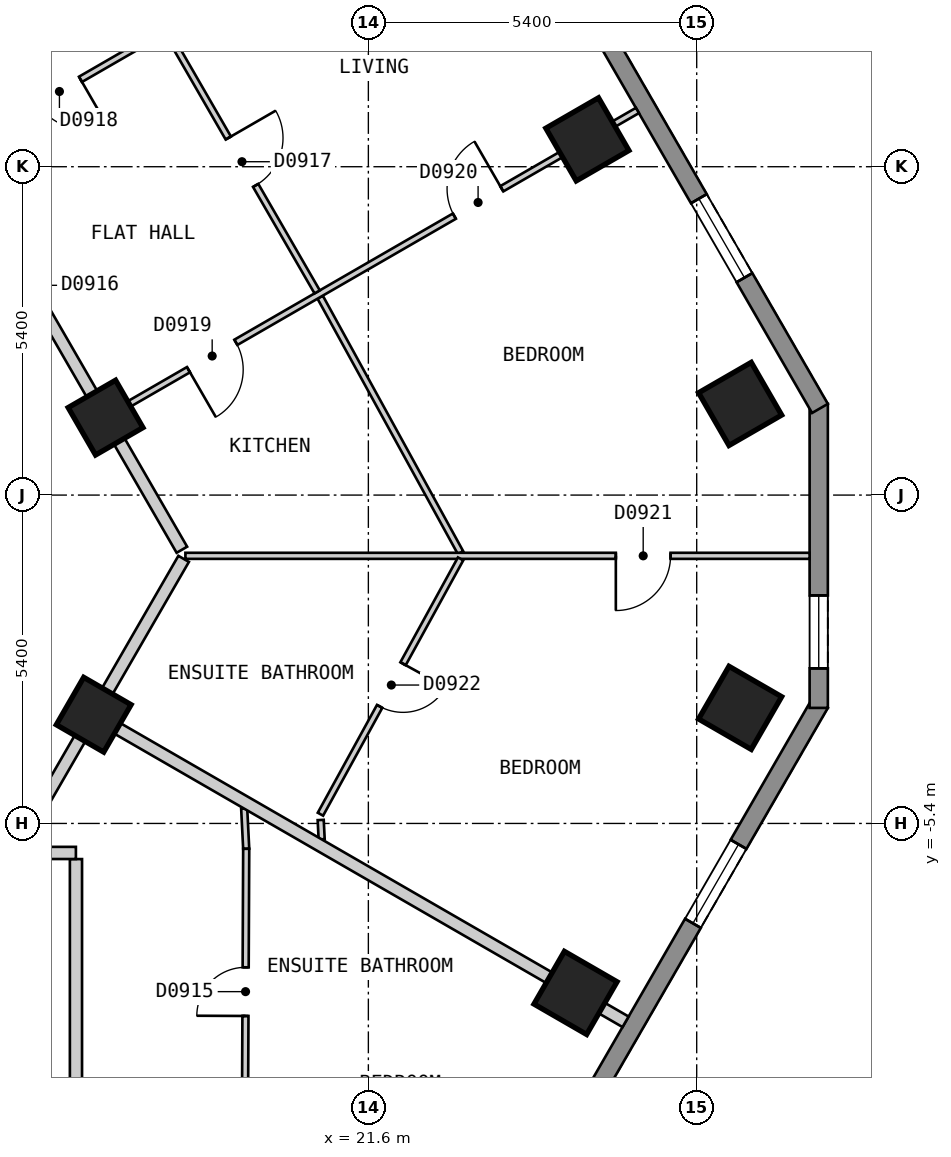
"""IFC4 building model, lengths in metres.
Left out: names, types, materials, properties, quantities, classifications, styles, units other than length and angle.
Written with IfcOpenShell. Run it as: python <this file> out.ifc"""

import sys

from ifc_helpers import new_model, si_unit, direction, frame, frame_2d, origin, origin_2d, place, context, subcontext, project, spatial, polyline, rectangle, outline, extrude, element, fill, save


model = new_model("IFC4")
c1 = context("Model", 3, precision=1e-05, world=origin(), true_north=direction((0.0, 1.0)))
c2 = subcontext(c1, "Body", "Model", "MODEL_VIEW")
j1 = project(units=[si_unit("LENGTHUNIT", "METRE"), si_unit("PLANEANGLEUNIT", "RADIAN")], contexts=[c1])
p1 = place(None, origin())
s1 = spatial("IfcSite", under=j1, at=p1, CompositionType="ELEMENT")
p2 = place(p1, origin())
s2 = spatial("IfcBuilding", under=s1, at=p2, CompositionType="ELEMENT")
p3 = place(p2, frame((0.0, 0.0, 102.0)))
s3 = spatial("IfcBuildingStorey", under=s2, at=p3, CompositionType="ELEMENT", Elevation=102.0)
for number, where, z_axis, x_axis in (
    (1, (25.007, -8.187, 0.0), (0.0, 0.0, 1.0), (0.5, 0.866, 0.0)),
    (2, (27.714, -3.499, 0.0), (0.0, 0.0, 1.0), (0.5, 0.866, 0.0)),
    (3, (27.714, 1.499, 0.0), (0.0, 0.0, 1.0), (-0.5, 0.866, 0.0)),
    (4, (25.202, 5.85, 0.0), (0.0, 0.0, 1.0), (-0.5, 0.866, 0.0)),
):
    element("IfcColumn", number, at=place(p3, frame(where, z_axis=z_axis, x_axis=x_axis)), inside=s3, PredefinedType="COLUMN", context=c2, shape_type="SweptSolid", body=[
        extrude(rectangle(XDim=1.0, YDim=1.0, at=origin_2d()), origin(), (0.0, 0.0, 1.0), 3.0),
    ])
for number, where, z_axis, x_axis in (
    (5, (17.083, -3.612, 0.0), (0.0, 0.0, 1.0), (0.5, 0.866, 0.0)),
    (6, (17.278, 1.274, 0.0), (0.0, 0.0, 1.0), (-0.5, 0.866, 0.0)),
):
    element("IfcColumn", number, at=place(p3, frame(where, z_axis=z_axis, x_axis=x_axis)), inside=s3, PredefinedType="COLUMN", context=c2, shape_type="SweptSolid", body=[
        extrude(rectangle(XDim=0.9, YDim=0.9, at=origin_2d()), origin(), (0.0, 0.0, 1.0), 3.0),
    ])
p4 = place(p3, frame((17.479, -23.425, 0.0), z_axis=(0.0, 0.0, 1.0), x_axis=(0.500035407905, 0.866004960056, 0.0)))
e7 = element("IfcWall", 7, at=p4, inside=s3, PredefinedType="SOLIDWALL", context=c2, shape_type="SweptSolid", body=[
    extrude(outline(polyline([(0.0, -0.15), (23.094, -0.15), (23.014, 0.15), (0.08, 0.15), (0.0, -0.15)])), origin(), (0.0, 0.0, 1.0), 2.7),
])
p5 = place(p4, frame((2.677, 0.0, 0.15)))
e8 = element("IfcOpeningElement", 8, at=p5, cuts=e7, PredefinedType="OPENING", context=c2, shape_type="SweptSolid", body=[
    extrude(rectangle(XDim=1.5, YDim=2.1, at=frame_2d((0.75, 1.05))), frame((0.0, 0.16, 0.0), z_axis=(0.0, -1.0, 0.0), x_axis=(1.0, 0.0, 0.0)), (0.0, 0.0, 1.0), 0.32),
])
p6 = place(p4, frame((8.091, 0.0, 0.15)))
e9 = element("IfcOpeningElement", 9, at=p6, cuts=e7, PredefinedType="OPENING", context=c2, shape_type="SweptSolid", body=[
    extrude(rectangle(XDim=1.5, YDim=2.1, at=frame_2d((0.75, 1.05))), frame((0.0, 0.16, 0.0), z_axis=(0.0, -1.0, 0.0), x_axis=(1.0, 0.0, 0.0)), (0.0, 0.0, 1.0), 0.32),
])
p7 = place(p4, frame((13.504, 0.0, 0.15)))
e10 = element("IfcOpeningElement", 10, at=p7, cuts=e7, PredefinedType="OPENING", context=c2, shape_type="SweptSolid", body=[
    extrude(rectangle(XDim=1.5, YDim=2.1, at=frame_2d((0.75, 1.05))), frame((0.0, 0.16, 0.0), z_axis=(0.0, -1.0, 0.0), x_axis=(1.0, 0.0, 0.0)), (0.0, 0.0, 1.0), 0.32),
])
p8 = place(p4, frame((18.917, 0.0, 0.15)))
e11 = element("IfcOpeningElement", 11, at=p8, cuts=e7, PredefinedType="OPENING", context=c2, shape_type="SweptSolid", body=[
    extrude(rectangle(XDim=1.5, YDim=2.1, at=frame_2d((0.75, 1.05))), frame((0.0, 0.16, 0.0), z_axis=(0.0, -1.0, 0.0), x_axis=(1.0, 0.0, 0.0)), (0.0, 0.0, 1.0), 0.32),
])
p9 = place(p3, frame((29.007, -3.5, 0.0), z_axis=(0.0, 0.0, 1.0), x_axis=(0.0, 1.0, 0.0)))
e12 = element("IfcWall", 12, at=p9, inside=s3, PredefinedType="SOLIDWALL", context=c2, shape_type="SweptSolid", body=[
    extrude(outline(polyline([(0.0, -0.15), (5.0, -0.15), (4.92, 0.15), (0.08, 0.15), (0.0, -0.15)])), origin(), (0.0, 0.0, 1.0), 2.7),
])
p10 = place(p9, frame((0.65, 0.0, 0.15)))
e13 = element("IfcOpeningElement", 13, at=p10, cuts=e12, PredefinedType="OPENING", context=c2, shape_type="SweptSolid", body=[
    extrude(rectangle(XDim=1.2, YDim=2.1, at=frame_2d((0.6, 1.05))), frame((0.0, 0.16, 0.0), z_axis=(0.0, -1.0, 0.0), x_axis=(1.0, 0.0, 0.0)), (0.0, 0.0, 1.0), 0.32),
])
p11 = place(p3, frame((29.027, 1.425, 0.0), z_axis=(0.0, 0.0, 1.0), x_axis=(-0.500027479704, 0.866009537788, 0.0)))
e14 = element("IfcWall", 14, at=p11, inside=s3, PredefinedType="SOLIDWALL", context=c2, shape_type="SweptSolid", body=[
    extrude(outline(polyline([(0.0, -0.15), (26.559, -0.15), (26.478, 0.15), (0.08, 0.15), (0.0, -0.15)])), origin(), (0.0, 0.0, 1.0), 2.7),
])
p12 = place(p11, frame((2.483, 0.0, 0.15)))
e15 = element("IfcOpeningElement", 15, at=p12, cuts=e14, PredefinedType="OPENING", context=c2, shape_type="SweptSolid", body=[
    extrude(rectangle(XDim=1.5, YDim=2.1, at=frame_2d((0.75, 1.05))), frame((0.0, 0.16, 0.0), z_axis=(0.0, -1.0, 0.0), x_axis=(1.0, 0.0, 0.0)), (0.0, 0.0, 1.0), 0.32),
])
p13 = place(p11, frame((7.506, 0.0, 0.15)))
e16 = element("IfcOpeningElement", 16, at=p13, cuts=e14, PredefinedType="OPENING", context=c2, shape_type="SweptSolid", body=[
    extrude(rectangle(XDim=1.5, YDim=2.1, at=frame_2d((0.75, 1.05))), frame((0.0, 0.16, 0.0), z_axis=(0.0, -1.0, 0.0), x_axis=(1.0, 0.0, 0.0)), (0.0, 0.0, 1.0), 0.32),
])
p14 = place(p11, frame((12.529, 0.0, 0.15)))
e17 = element("IfcOpeningElement", 17, at=p14, cuts=e14, PredefinedType="OPENING", context=c2, shape_type="SweptSolid", body=[
    extrude(rectangle(XDim=1.5, YDim=2.1, at=frame_2d((0.75, 1.05))), frame((0.0, 0.16, 0.0), z_axis=(0.0, -1.0, 0.0), x_axis=(1.0, 0.0, 0.0)), (0.0, 0.0, 1.0), 0.32),
])
p15 = place(p11, frame((17.552, 0.0, 0.15)))
e18 = element("IfcOpeningElement", 18, at=p15, cuts=e14, PredefinedType="OPENING", context=c2, shape_type="SweptSolid", body=[
    extrude(rectangle(XDim=1.5, YDim=2.1, at=frame_2d((0.75, 1.05))), frame((0.0, 0.16, 0.0), z_axis=(0.0, -1.0, 0.0), x_axis=(1.0, 0.0, 0.0)), (0.0, 0.0, 1.0), 0.32),
])
p16 = place(p11, frame((22.575, 0.0, 0.15)))
e19 = element("IfcOpeningElement", 19, at=p16, cuts=e14, PredefinedType="OPENING", context=c2, shape_type="SweptSolid", body=[
    extrude(rectangle(XDim=1.5, YDim=2.1, at=frame_2d((0.75, 1.05))), frame((0.0, 0.16, 0.0), z_axis=(0.0, -1.0, 0.0), x_axis=(1.0, 0.0, 0.0)), (0.0, 0.0, 1.0), 0.32),
])
p17 = place(p3, frame((8.488, 16.5, 0.0), z_axis=(0.0, 0.0, 1.0), x_axis=(0.499986836607, -0.86603300354, 0.0)))
e20 = element("IfcWall", 20, at=p17, inside=s3, PredefinedType="PARTITIONING", context=c2, shape_type="SweptSolid", body=[
    extrude(rectangle(XDim=20.09, YDim=0.2, at=frame_2d((10.045, 0.0))), origin(), (0.0, 0.0, 1.0), 2.7),
])
p18 = place(p17, frame((14.569, 0.0, 0.0)))
e21 = element("IfcOpeningElement", 21, at=p18, cuts=e20, PredefinedType="OPENING", context=c2, shape_type="SweptSolid", body=[
    extrude(rectangle(XDim=1.0, YDim=2.1, at=frame_2d((0.5, 1.05))), frame((0.0, 0.11, 0.0), z_axis=(0.0, -1.0, 0.0), x_axis=(1.0, 0.0, 0.0)), (0.0, 0.0, 1.0), 0.22),
])
p19 = place(p17, frame((4.547, 0.0, 0.0)))
e22 = element("IfcOpeningElement", 22, at=p19, cuts=e20, PredefinedType="OPENING", context=c2, shape_type="SweptSolid", body=[
    extrude(rectangle(XDim=1.0, YDim=2.1, at=frame_2d((0.5, 1.05))), frame((0.0, 0.11, 0.0), z_axis=(0.0, -1.0, 0.0), x_axis=(1.0, 0.0, 0.0)), (0.0, 0.0, 1.0), 0.22),
])
p20 = place(p3, frame((16.791, -5.986, 0.0), z_axis=(0.0, 0.0, 1.0), x_axis=(0.0, -1.0, 0.0)))
e23 = element("IfcWall", 23, at=p20, inside=s3, PredefinedType="PARTITIONING", context=c2, shape_type="SweptSolid", body=[
    extrude(rectangle(XDim=3.65, YDim=0.2, at=frame_2d((1.825, 0.0))), origin(), (0.0, 0.0, 1.0), 2.7),
])
p21 = place(p3, frame((15.887, -5.885, 0.0), z_axis=(0.0, 0.0, 1.0), x_axis=(1.0, 0.0, 0.0)))
e24 = element("IfcWall", 24, at=p21, inside=s3, PredefinedType="PARTITIONING", context=c2, shape_type="SweptSolid", body=[
    extrude(rectangle(XDim=0.903, YDim=0.2, at=frame_2d((0.452, 0.0))), origin(), (0.0, 0.0, 1.0), 2.7),
])
p22 = place(p3, frame((15.771, -5.884, 0.0), z_axis=(0.0, 0.0, 1.0), x_axis=(0.499939494019, 0.866060334111, 0.0)))
e25 = element("IfcWall", 25, at=p22, inside=s3, PredefinedType="PARTITIONING", context=c2, shape_type="SweptSolid", body=[
    extrude(rectangle(XDim=5.583, YDim=0.2, at=frame_2d((2.792, 0.0))), origin(), (0.0, 0.0, 1.0), 2.7),
])
p23 = place(p3, frame((20.807, 3.255, 0.0), z_axis=(0.0, 0.0, 1.0), x_axis=(0.481604009855, -0.876388942018, 0.0)))
e26 = element("IfcWall", 26, at=p23, inside=s3, PredefinedType="PARTITIONING", context=c2, shape_type="SweptSolid", body=[
    extrude(rectangle(XDim=4.795, YDim=0.1, at=frame_2d((2.397, 0.0))), origin(), (0.0, 0.0, 1.0), 2.7),
])
p24 = place(p3, frame((19.558, -5.156, 0.0), z_axis=(0.0, 0.0, 1.0), x_axis=(0.04980880462, -0.998758771167, 0.0)))
e27 = element("IfcWall", 27, at=p24, inside=s3, PredefinedType="PARTITIONING", context=c2, shape_type="SweptSolid", body=[
    extrude(rectangle(XDim=0.662, YDim=0.1, at=frame_2d((0.331, 0.0))), origin(), (0.0, 0.0, 1.0), 2.7),
])
p25 = place(p3, frame((20.816, -5.343, 0.0), z_axis=(0.0, 0.0, 1.0), x_axis=(0.050626241319, -0.998717669659, 0.0)))
e28 = element("IfcWall", 28, at=p25, inside=s3, PredefinedType="PARTITIONING", context=c2, shape_type="SweptSolid", body=[
    extrude(rectangle(XDim=0.318, YDim=0.1, at=frame_2d((0.159, 0.0))), origin(), (0.0, 0.0, 1.0), 2.7),
])
p26 = place(p3, frame((18.591, -0.999, 0.0), z_axis=(0.0, 0.0, 1.0), x_axis=(1.0, 0.0, 0.0)))
e29 = element("IfcWall", 29, at=p26, inside=s3, PredefinedType="PARTITIONING", context=c2, shape_type="SweptSolid", body=[
    extrude(rectangle(XDim=10.266, YDim=0.1, at=frame_2d((5.133, 0.0))), origin(), (0.0, 0.0, 1.0), 2.7),
])
p27 = place(p26, frame((7.079, 0.0, 0.0)))
e30 = element("IfcOpeningElement", 30, at=p27, cuts=e29, PredefinedType="OPENING", context=c2, shape_type="SweptSolid", body=[
    extrude(rectangle(XDim=0.9, YDim=2.1, at=frame_2d((0.45, 1.05))), frame((0.0, 0.06, 0.0), z_axis=(0.0, -1.0, 0.0), x_axis=(1.0, 0.0, 0.0)), (0.0, 0.0, 1.0), 0.12),
])
p28 = place(p3, frame((20.812, -5.248, 0.0), z_axis=(0.0, 0.0, 1.0), x_axis=(0.481196609449, 0.876612698434, 0.0)))
e31 = element("IfcWall", 31, at=p28, inside=s3, PredefinedType="PARTITIONING", context=c2, shape_type="SweptSolid", body=[
    extrude(rectangle(XDim=4.79, YDim=0.1, at=frame_2d((2.395, 0.0))), origin(), (0.0, 0.0, 1.0), 2.7),
])
p29 = place(p28, frame((2.023, 0.0, 0.0)))
e32 = element("IfcOpeningElement", 32, at=p29, cuts=e31, PredefinedType="OPENING", context=c2, shape_type="SweptSolid", body=[
    extrude(rectangle(XDim=0.8, YDim=2.1, at=frame_2d((0.4, 1.05))), frame((0.0, 0.06, 0.0), z_axis=(0.0, -1.0, 0.0), x_axis=(1.0, 0.0, 0.0)), (0.0, 0.0, 1.0), 0.12),
])
p30 = place(p3, frame((19.566, -11.238, 0.0), z_axis=(0.0, 0.0, 1.0), x_axis=(0.004638545009, 0.999989241892, 0.0)))
e33 = element("IfcWall", 33, at=p30, inside=s3, PredefinedType="PARTITIONING", context=c2, shape_type="SweptSolid", body=[
    extrude(rectangle(XDim=5.421, YDim=0.1, at=frame_2d((2.71, 0.0))), origin(), (0.0, 0.0, 1.0), 2.7),
])
p31 = place(p30, frame((2.672, 0.0, 0.0)))
e34 = element("IfcOpeningElement", 34, at=p31, cuts=e33, PredefinedType="OPENING", context=c2, shape_type="SweptSolid", body=[
    extrude(rectangle(XDim=0.8, YDim=2.1, at=frame_2d((0.4, 1.05))), frame((0.0, 0.06, 0.0), z_axis=(0.0, -1.0, 0.0), x_axis=(1.0, 0.0, 0.0)), (0.0, 0.0, 1.0), 0.12),
])
p32 = place(p3, frame((17.365, 1.325, 0.0), z_axis=(0.0, 0.0, 1.0), x_axis=(0.866016855193, 0.500014806302, 0.0)))
e35 = element("IfcWall", 35, at=p32, inside=s3, PredefinedType="PARTITIONING", context=c2, shape_type="SweptSolid", body=[
    extrude(rectangle(XDim=10.0, YDim=0.1, at=frame_2d((5.0, 0.0))), origin(), (0.0, 0.0, 1.0), 2.7),
])
p33 = place(p32, frame((1.474, 0.0, 0.0)))
e36 = element("IfcOpeningElement", 36, at=p33, cuts=e35, PredefinedType="OPENING", context=c2, shape_type="SweptSolid", body=[
    extrude(rectangle(XDim=0.9, YDim=2.1, at=frame_2d((0.45, 1.05))), frame((0.0, 0.06, 0.0), z_axis=(0.0, -1.0, 0.0), x_axis=(1.0, 0.0, 0.0)), (0.0, 0.0, 1.0), 0.12),
])
p34 = place(p32, frame((6.524, 0.0, 0.0)))
e37 = element("IfcOpeningElement", 37, at=p34, cuts=e35, PredefinedType="OPENING", context=c2, shape_type="SweptSolid", body=[
    extrude(rectangle(XDim=0.9, YDim=2.1, at=frame_2d((0.45, 1.05))), frame((0.0, 0.06, 0.0), z_axis=(0.0, -1.0, 0.0), x_axis=(1.0, 0.0, 0.0)), (0.0, 0.0, 1.0), 0.12),
])
p35 = place(p3, frame((14.853, 5.675, 0.0), z_axis=(0.0, 0.0, 1.0), x_axis=(0.865979019114, 0.500080332001, 0.0)))
e38 = element("IfcWall", 38, at=p35, inside=s3, PredefinedType="PARTITIONING", context=c2, shape_type="SweptSolid", body=[
    extrude(rectangle(XDim=3.897, YDim=0.1, at=frame_2d((1.949, 0.0))), origin(), (0.0, 0.0, 1.0), 2.7),
])
p36 = place(p35, frame((1.524, 0.0, 0.0)))
e39 = element("IfcOpeningElement", 39, at=p36, cuts=e38, PredefinedType="OPENING", context=c2, shape_type="SweptSolid", body=[
    extrude(rectangle(XDim=0.8, YDim=2.1, at=frame_2d((0.4, 1.05))), frame((0.0, 0.06, 0.0), z_axis=(0.0, -1.0, 0.0), x_axis=(1.0, 0.0, 0.0)), (0.0, 0.0, 1.0), 0.12),
])
p37 = place(p3, frame((17.169, -3.662, 0.0), z_axis=(0.0, 0.0, 1.0), x_axis=(0.866047370643, -0.499961950354, 0.0)))
e40 = element("IfcWall", 40, at=p37, inside=s3, PredefinedType="PARTITIONING", context=c2, shape_type="SweptSolid", body=[
    extrude(rectangle(XDim=10.001, YDim=0.2, at=frame_2d((5.0, 0.0))), origin(), (0.0, 0.0, 1.0), 2.7),
])
p38 = place(p3, frame((15.759, 11.998, 0.0), z_axis=(0.0, 0.0, 1.0), x_axis=(0.500068444113, -0.865985883951, 0.0)))
e41 = element("IfcWall", 41, at=p38, inside=s3, PredefinedType="PARTITIONING", context=c2, shape_type="SweptSolid", body=[
    extrude(rectangle(XDim=9.997, YDim=0.1, at=frame_2d((4.998, 0.0))), origin(), (0.0, 0.0, 1.0), 2.7),
])
p39 = place(p38, frame((7.074, 0.0, 0.0)))
e42 = element("IfcOpeningElement", 42, at=p39, cuts=e41, PredefinedType="OPENING", context=c2, shape_type="SweptSolid", body=[
    extrude(rectangle(XDim=0.9, YDim=2.1, at=frame_2d((0.45, 1.05))), frame((0.0, 0.06, 0.0), z_axis=(0.0, -1.0, 0.0), x_axis=(1.0, 0.0, 0.0)), (0.0, 0.0, 1.0), 0.12),
])
p40 = place(p8, origin())
e43 = element("IfcWindow", 43, at=p40, inside=s3, PartitioningType="SINGLE_PANEL", PredefinedType="WINDOW", context=c2, shape_type="SweptSolid", body=[
    extrude(rectangle(XDim=1.5, YDim=2.1, at=frame_2d((0.75, 1.05))), frame((0.0, 0.03, 0.0), z_axis=(0.0, -1.0, 0.0), x_axis=(1.0, 0.0, 0.0)), (0.0, 0.0, 1.0), 0.06),
])
fill(e11, e43)
p41 = place(p10, origin())
e44 = element("IfcWindow", 44, at=p41, inside=s3, PartitioningType="SINGLE_PANEL", PredefinedType="WINDOW", context=c2, shape_type="SweptSolid", body=[
    extrude(rectangle(XDim=1.2, YDim=2.1, at=frame_2d((0.6, 1.05))), frame((0.0, 0.03, 0.0), z_axis=(0.0, -1.0, 0.0), x_axis=(1.0, 0.0, 0.0)), (0.0, 0.0, 1.0), 0.06),
])
fill(e13, e44)
p42 = place(p12, origin())
e45 = element("IfcWindow", 45, at=p42, inside=s3, PartitioningType="SINGLE_PANEL", PredefinedType="WINDOW", context=c2, shape_type="SweptSolid", body=[
    extrude(rectangle(XDim=1.5, YDim=2.1, at=frame_2d((0.75, 1.05))), frame((0.0, 0.03, 0.0), z_axis=(0.0, -1.0, 0.0), x_axis=(1.0, 0.0, 0.0)), (0.0, 0.0, 1.0), 0.06),
])
fill(e15, e45)
p43 = place(p31, origin())
e46 = element("IfcDoor", 46, at=p43, inside=s3, OperationType="SINGLE_SWING_LEFT", PredefinedType="DOOR", context=c2, shape_type="SweptSolid", body=[
    extrude(rectangle(XDim=0.8, YDim=2.1, at=frame_2d((0.4, 1.05))), frame((0.0, 0.025, 0.0), z_axis=(0.0, -1.0, 0.0), x_axis=(1.0, 0.0, 0.0)), (0.0, 0.0, 1.0), 0.05),
])
fill(e34, e46)
p44 = place(p39, origin())
e47 = element("IfcDoor", 47, at=p44, inside=s3, OperationType="SINGLE_SWING_LEFT", PredefinedType="DOOR", context=c2, shape_type="SweptSolid", body=[
    extrude(rectangle(XDim=0.9, YDim=2.1, at=frame_2d((0.45, 1.05))), frame((0.0, 0.025, 0.0), z_axis=(0.0, -1.0, 0.0), x_axis=(1.0, 0.0, 0.0)), (0.0, 0.0, 1.0), 0.05),
])
fill(e42, e47)
p45 = place(p36, origin())
e48 = element("IfcDoor", 48, at=p45, inside=s3, OperationType="SINGLE_SWING_RIGHT", PredefinedType="DOOR", context=c2, shape_type="SweptSolid", body=[
    extrude(rectangle(XDim=0.8, YDim=2.1, at=frame_2d((0.4, 1.05))), frame((0.0, 0.025, 0.0), z_axis=(0.0, -1.0, 0.0), x_axis=(1.0, 0.0, 0.0)), (0.0, 0.0, 1.0), 0.05),
])
fill(e39, e48)
p46 = place(p33, origin())
e49 = element("IfcDoor", 49, at=p46, inside=s3, OperationType="SINGLE_SWING_LEFT", PredefinedType="DOOR", context=c2, shape_type="SweptSolid", body=[
    extrude(rectangle(XDim=0.9, YDim=2.1, at=frame_2d((0.45, 1.05))), frame((0.0, 0.025, 0.0), z_axis=(0.0, -1.0, 0.0), x_axis=(1.0, 0.0, 0.0)), (0.0, 0.0, 1.0), 0.05),
])
fill(e36, e49)
p47 = place(p34, origin())
e50 = element("IfcDoor", 50, at=p47, inside=s3, OperationType="SINGLE_SWING_RIGHT", PredefinedType="DOOR", context=c2, shape_type="SweptSolid", body=[
    extrude(rectangle(XDim=0.9, YDim=2.1, at=frame_2d((0.45, 1.05))), frame((0.0, 0.025, 0.0), z_axis=(0.0, -1.0, 0.0), x_axis=(1.0, 0.0, 0.0)), (0.0, 0.0, 1.0), 0.05),
])
fill(e37, e50)
p48 = place(p27, origin())
e51 = element("IfcDoor", 51, at=p48, inside=s3, OperationType="SINGLE_SWING_LEFT", PredefinedType="DOOR", context=c2, shape_type="SweptSolid", body=[
    extrude(rectangle(XDim=0.9, YDim=2.1, at=frame_2d((0.45, 1.05))), frame((0.0, 0.025, 0.0), z_axis=(0.0, -1.0, 0.0), x_axis=(1.0, 0.0, 0.0)), (0.0, 0.0, 1.0), 0.05),
])
fill(e30, e51)
p49 = place(p29, origin())
e52 = element("IfcDoor", 52, at=p49, inside=s3, OperationType="SINGLE_SWING_RIGHT", PredefinedType="DOOR", context=c2, shape_type="SweptSolid", body=[
    extrude(rectangle(XDim=0.8, YDim=2.1, at=frame_2d((0.4, 1.05))), frame((0.0, 0.025, 0.0), z_axis=(0.0, -1.0, 0.0), x_axis=(1.0, 0.0, 0.0)), (0.0, 0.0, 1.0), 0.05),
])
fill(e32, e52)
save(model, sys.argv[1])
